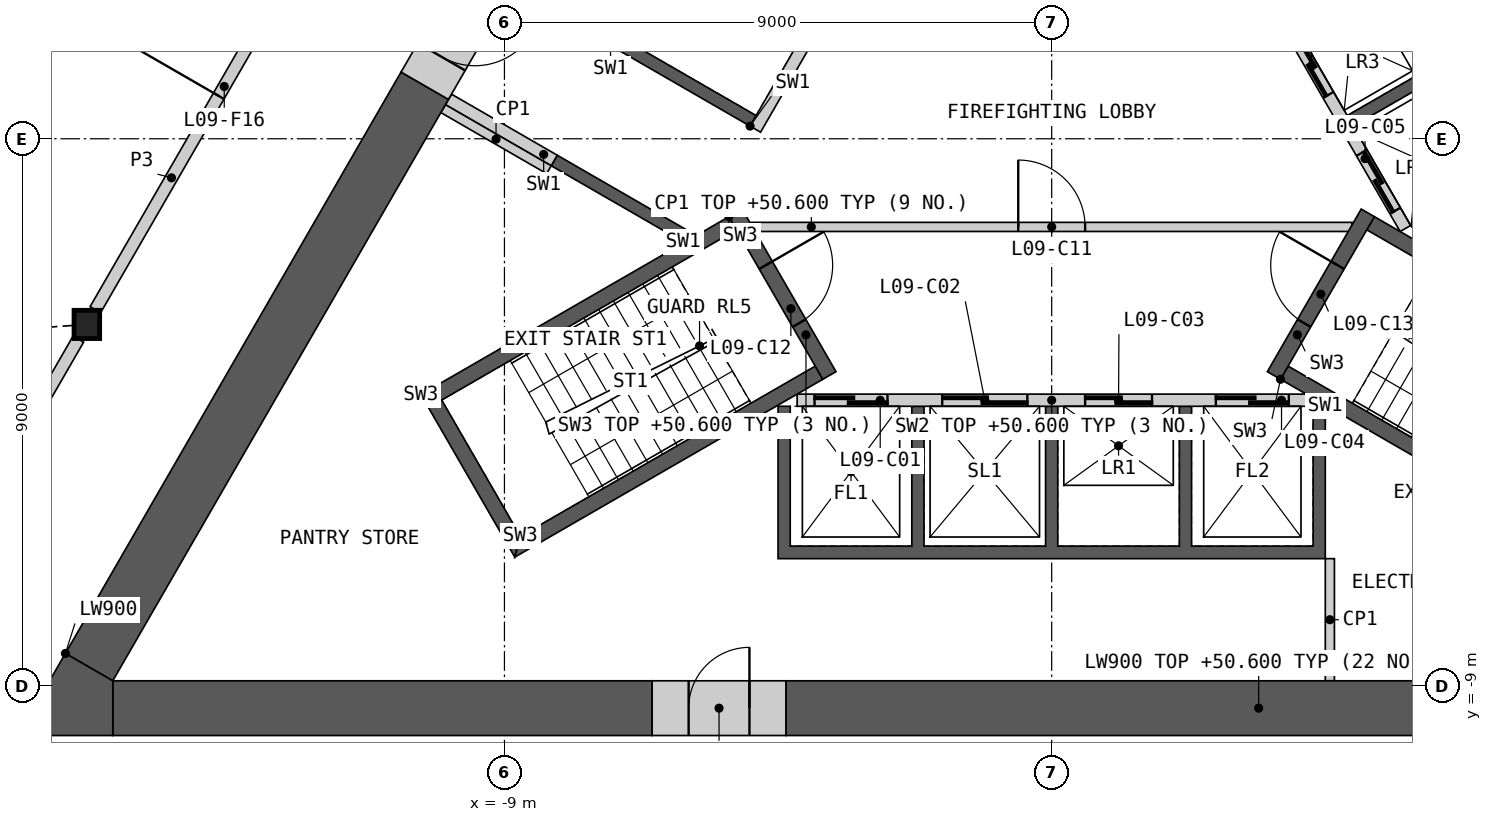
"""IFC4 building model, lengths in metres.
Left out: names, types, materials, properties, quantities, classifications, styles, units other than length and angle.
Written with IfcOpenShell. Run it as: python <this file> out.ifc"""

import sys

from ifc_helpers import new_model, si_unit, direction, frame, frame_2d, origin, origin_2d, place, context, subcontext, project, spatial, polyline, rectangle, i_section, outline, extrude, element, fill, save


model = new_model("IFC4")
c1 = context("Model", 3, precision=1e-05, world=origin(), true_north=direction((0.0, 1.0)))
c2 = subcontext(c1, "Body", "Model", "MODEL_VIEW")
j1 = project(units=[si_unit("LENGTHUNIT", "METRE"), si_unit("PLANEANGLEUNIT", "RADIAN")], contexts=[c1])
p1 = place(None, origin())
s1 = spatial("IfcSite", under=j1, at=p1, CompositionType="ELEMENT")
p2 = place(p1, origin())
s2 = spatial("IfcBuilding", under=s1, at=p2, CompositionType="ELEMENT")
p3 = place(p2, frame((0.0, 0.0, 46.8)))
s3 = spatial("IfcBuildingStorey", under=s2, at=p3, CompositionType="ELEMENT", Elevation=46.8)
p4 = place(p3, frame((-15.868, -3.054, 0.0), z_axis=(0.0, 0.0, 1.0), x_axis=(1.0, 0.0, 0.0)))
e1 = element("IfcColumn", 1, at=p4, inside=s3, PredefinedType="COLUMN", context=c2, shape_type="SweptSolid", body=[
    extrude(i_section(OverallWidth=0.421, OverallDepth=0.465, WebThickness=0.045, FlangeThickness=0.072, at=origin_2d()), origin(), (0.0, 0.0, 1.0), 4.2),
])
p5 = place(p3, origin())
e2 = element("IfcWall", 2, at=p5, inside=s3, PredefinedType="SHEAR", context=c2, shape_type="SweptSolid", body=[
    extrude(outline(polyline([(4.5, -4.4), (4.5, -6.906), (-4.5, -6.906), (-4.5, -4.4), (-4.3, -4.4), (-4.3, -6.7), (-2.3, -6.7), (-2.3, -4.4), (-2.1, -4.4), (-2.1, -6.7), (-0.1, -6.7), (-0.1, -4.4), (0.1, -4.4), (0.1, -6.7), (2.1, -6.7), (2.1, -4.4), (2.3, -4.4), (2.3, -6.7), (4.3, -6.7), (4.3, -4.4), (4.5, -4.4)])), origin(), (0.0, 0.0, 1.0), 3.8),
])
p6 = place(p3, frame((-4.187, -4.3, 0.0), z_axis=(0.0, 0.0, 1.0), x_axis=(1.0, 0.0, 0.0)))
e3 = element("IfcWall", 3, at=p6, inside=s3, PredefinedType="SOLIDWALL", context=c2, shape_type="SweptSolid", body=[
    extrude(rectangle(XDim=8.373, YDim=0.2, at=frame_2d((4.187, 0.0))), origin(), (0.0, 0.0, 1.0), 3.8),
])
p7 = place(p6, frame((0.287, 0.0, 0.0)))
e4 = element("IfcOpeningElement", 4, at=p7, cuts=e3, PredefinedType="OPENING", context=c2, shape_type="SweptSolid", body=[
    extrude(rectangle(XDim=1.2, YDim=2.1, at=frame_2d((0.6, 1.05))), frame((0.0, 0.11, 0.0), z_axis=(0.0, -1.0, 0.0), x_axis=(1.0, 0.0, 0.0)), (0.0, 0.0, 1.0), 0.22),
])
p8 = place(p6, frame((2.387, 0.0, 0.0)))
e5 = element("IfcOpeningElement", 5, at=p8, cuts=e3, PredefinedType="OPENING", context=c2, shape_type="SweptSolid", body=[
    extrude(rectangle(XDim=1.4, YDim=2.1, at=frame_2d((0.7, 1.05))), frame((0.0, 0.11, 0.0), z_axis=(0.0, -1.0, 0.0), x_axis=(1.0, 0.0, 0.0)), (0.0, 0.0, 1.0), 0.22),
])
p9 = place(p6, frame((4.737, 0.0, 0.0)))
e6 = element("IfcOpeningElement", 6, at=p9, cuts=e3, PredefinedType="OPENING", context=c2, shape_type="SweptSolid", body=[
    extrude(rectangle(XDim=1.1, YDim=2.1, at=frame_2d((0.55, 1.05))), frame((0.0, 0.11, 0.0), z_axis=(0.0, -1.0, 0.0), x_axis=(1.0, 0.0, 0.0)), (0.0, 0.0, 1.0), 0.22),
])
p10 = place(p6, frame((6.887, 0.0, 0.0)))
e7 = element("IfcOpeningElement", 7, at=p10, cuts=e3, PredefinedType="OPENING", context=c2, shape_type="SweptSolid", body=[
    extrude(rectangle(XDim=1.2, YDim=2.1, at=frame_2d((0.6, 1.05))), frame((0.0, 0.11, 0.0), z_axis=(0.0, -1.0, 0.0), x_axis=(1.0, 0.0, 0.0)), (0.0, 0.0, 1.0), 0.22),
])
p11 = place(p3, origin())
e8 = element("IfcWall", 8, at=p11, inside=s3, PredefinedType="SHEAR", context=c2, shape_type="SweptSolid", body=[
    extrude(outline(polyline([(2.66, 4.192), (4.831, 5.445), (8.231, -0.444), (6.061, -1.697), (5.96, -1.524), (7.952, -0.374), (6.952, 1.358), (4.96, 0.208), (4.861, 0.381), (6.852, 1.531), (5.852, 3.263), (3.861, 2.113), (3.76, 2.287), (5.752, 3.437), (4.752, 5.169), (2.76, 4.019), (2.66, 4.192)])), origin(), (0.0, 0.0, 1.0), 3.8),
])
p12 = place(p3, frame((5.817, -1.476, 0.0), z_axis=(0.0, 0.0, 1.0), x_axis=(-0.500002616675, 0.866023893041, 0.0)))
e9 = element("IfcWall", 9, at=p12, inside=s3, PredefinedType="SOLIDWALL", context=c2, shape_type="SweptSolid", body=[
    extrude(rectangle(XDim=8.373, YDim=0.2, at=frame_2d((4.187, 0.0))), origin(), (0.0, 0.0, 1.0), 3.8),
])
p13 = place(p12, frame((0.337, 0.0, 0.0)))
e10 = element("IfcOpeningElement", 10, at=p13, cuts=e9, PredefinedType="OPENING", context=c2, shape_type="SweptSolid", body=[
    extrude(rectangle(XDim=1.1, YDim=2.1, at=frame_2d((0.55, 1.05))), frame((0.0, 0.11, 0.0), z_axis=(0.0, -1.0, 0.0), x_axis=(1.0, 0.0, 0.0)), (0.0, 0.0, 1.0), 0.22),
])
p14 = place(p12, frame((2.537, 0.0, 0.0)))
e11 = element("IfcOpeningElement", 11, at=p14, cuts=e9, PredefinedType="OPENING", context=c2, shape_type="SweptSolid", body=[
    extrude(rectangle(XDim=1.1, YDim=2.1, at=frame_2d((0.55, 1.05))), frame((0.0, 0.11, 0.0), z_axis=(0.0, -1.0, 0.0), x_axis=(1.0, 0.0, 0.0)), (0.0, 0.0, 1.0), 0.22),
])
p15 = place(p12, frame((4.737, 0.0, 0.0)))
e12 = element("IfcOpeningElement", 12, at=p15, cuts=e9, PredefinedType="OPENING", context=c2, shape_type="SweptSolid", body=[
    extrude(rectangle(XDim=1.1, YDim=2.1, at=frame_2d((0.55, 1.05))), frame((0.0, 0.11, 0.0), z_axis=(0.0, -1.0, 0.0), x_axis=(1.0, 0.0, 0.0)), (0.0, 0.0, 1.0), 0.22),
])
p16 = place(p12, frame((7.037, 0.0, 0.0)))
e13 = element("IfcOpeningElement", 13, at=p16, cuts=e9, PredefinedType="OPENING", context=c2, shape_type="SweptSolid", body=[
    extrude(rectangle(XDim=0.9, YDim=2.1, at=frame_2d((0.45, 1.05))), frame((0.0, 0.11, 0.0), z_axis=(0.0, -1.0, 0.0), x_axis=(1.0, 0.0, 0.0)), (0.0, 0.0, 1.0), 0.22),
])
p17 = place(p3, origin())
e14 = element("IfcWall", 14, at=p17, inside=s3, PredefinedType="SHEAR", context=c2, shape_type="SweptSolid", body=[
    extrude(outline(polyline([(-6.061, -1.697), (-8.231, -0.444), (-8.131, -0.271), (-5.96, -1.524), (-6.061, -1.697)])), origin(), (0.0, 0.0, 1.0), 3.8),
])
p18 = place(p3, origin())
e15 = element("IfcWall", 15, at=p18, inside=s3, PredefinedType="SHEAR", context=c2, shape_type="SweptSolid", body=[
    extrude(outline(polyline([(-4.96, 0.208), (-7.131, 1.461), (-5.931, 3.54), (-3.76, 2.287), (-3.861, 2.113), (-5.852, 3.263), (-6.852, 1.531), (-4.861, 0.381), (-4.96, 0.208)])), origin(), (0.0, 0.0, 1.0), 3.8),
])
p19 = place(p3, frame((-1.631, 5.776, 0.0), z_axis=(0.0, 0.0, 1.0), x_axis=(-0.499992876559, -0.866029516466, 0.0)))
e16 = element("IfcWall", 16, at=p19, inside=s3, PredefinedType="SOLIDWALL", context=c2, shape_type="SweptSolid", body=[
    extrude(rectangle(XDim=6.486, YDim=0.2, at=frame_2d((3.243, 0.0))), origin(), (0.0, 0.0, 1.0), 3.8),
])
p20 = place(p19, frame((0.437, 0.0, 0.0)))
e17 = element("IfcOpeningElement", 17, at=p20, cuts=e16, PredefinedType="OPENING", context=c2, shape_type="SweptSolid", body=[
    extrude(rectangle(XDim=0.9, YDim=2.1, at=frame_2d((0.45, 1.05))), frame((0.0, 0.11, 0.0), z_axis=(0.0, -1.0, 0.0), x_axis=(1.0, 0.0, 0.0)), (0.0, 0.0, 1.0), 0.22),
])
p21 = place(p19, frame((2.637, 0.0, 0.0)))
e18 = element("IfcOpeningElement", 18, at=p21, cuts=e16, PredefinedType="OPENING", context=c2, shape_type="SweptSolid", body=[
    extrude(rectangle(XDim=0.9, YDim=2.1, at=frame_2d((0.45, 1.05))), frame((0.0, 0.11, 0.0), z_axis=(0.0, -1.0, 0.0), x_axis=(1.0, 0.0, 0.0)), (0.0, 0.0, 1.0), 0.22),
])
p22 = place(p3, frame((-8.181, -0.357, 0.0), z_axis=(0.0, 0.0, 1.0), x_axis=(-0.866035824272, 0.499981950752, 0.0)))
e19 = element("IfcWall", 19, at=p22, inside=s3, PredefinedType="SHEAR", context=c2, shape_type="SweptSolid", body=[
    extrude(rectangle(XDim=2.009, YDim=0.2, at=frame_2d((1.004, 0.0))), origin(), (0.0, 0.0, 1.0), 3.8),
])
p23 = place(p3, frame((-4.941, -1.45, 0.0), z_axis=(0.0, 0.0, 1.0), x_axis=(1.0, 0.0, 0.0)))
e20 = element("IfcWall", 20, at=p23, inside=s3, PredefinedType="PARTITIONING", context=c2, shape_type="SweptSolid", body=[
    extrude(rectangle(XDim=9.882, YDim=0.15, at=frame_2d((4.941, 0.0))), origin(), (0.0, 0.0, 1.0), 3.8),
])
p24 = place(p23, frame((4.391, 0.0, 0.0)))
e21 = element("IfcOpeningElement", 21, at=p24, cuts=e20, PredefinedType="OPENING", context=c2, shape_type="SweptSolid", body=[
    extrude(rectangle(XDim=1.1, YDim=2.1, at=frame_2d((0.55, 1.05))), frame((0.0, 0.085, 0.0), z_axis=(0.0, -1.0, 0.0), x_axis=(1.0, 0.0, 0.0)), (0.0, 0.0, 1.0), 0.17),
])
p25 = place(p3, origin())
e22 = element("IfcWall", 22, at=p25, inside=s3, PredefinedType="SHEAR", context=c2, shape_type="SweptSolid", body=[
    extrude(outline(polyline([(-5.307, -1.281), (-10.374, -4.206), (-10.032, -4.298), (-5.182, -1.498), (-5.307, -1.281)])), origin(), (0.0, 0.0, 1.0), 3.8),
])
p26 = place(p3, origin())
e23 = element("IfcWall", 23, at=p26, inside=s3, PredefinedType="SHEAR", context=c2, shape_type="SweptSolid", body=[
    extrude(outline(polyline([(-10.374, -4.206), (-8.83, -6.881), (-8.738, -6.539), (-10.032, -4.298), (-10.374, -4.206)])), origin(), (0.0, 0.0, 1.0), 3.8),
])
p27 = place(p3, origin())
e24 = element("IfcWall", 24, at=p27, inside=s3, PredefinedType="SHEAR", context=c2, shape_type="SweptSolid", body=[
    extrude(outline(polyline([(-8.738, -6.539), (-8.83, -6.881), (-3.763, -3.956), (-3.888, -3.739), (-8.738, -6.539)])), origin(), (0.0, 0.0, 1.0), 3.8),
])
p28 = place(p3, frame((-5.199, -1.219, 0.0), z_axis=(0.0, 0.0, 1.0), x_axis=(0.499982516597, -0.866035497597, 0.0)))
e25 = element("IfcWall", 25, at=p28, inside=s3, PredefinedType="SHEAR", context=c2, shape_type="SweptSolid", body=[
    extrude(rectangle(XDim=3.088, YDim=0.25, at=frame_2d((1.544, 0.0))), origin(), (0.0, 0.0, 1.0), 3.8),
])
p29 = place(p28, frame((0.994, 0.0, 0.0)))
e26 = element("IfcOpeningElement", 26, at=p29, cuts=e25, PredefinedType="OPENING", context=c2, shape_type="SweptSolid", body=[
    extrude(rectangle(XDim=1.1, YDim=2.1, at=frame_2d((0.55, 1.05))), frame((0.0, 0.135, 0.0), z_axis=(0.0, -1.0, 0.0), x_axis=(1.0, 0.0, 0.0)), (0.0, 0.0, 1.0), 0.27),
])
p30 = place(p3, origin())
e27 = element("IfcWall", 27, at=p30, inside=s3, PredefinedType="SHEAR", context=c2, shape_type="SweptSolid", body=[
    extrude(outline(polyline([(3.763, -3.956), (8.83, -6.881), (8.738, -6.539), (3.888, -3.739), (3.763, -3.956)])), origin(), (0.0, 0.0, 1.0), 3.8),
])
p31 = place(p3, origin())
e28 = element("IfcWall", 28, at=p31, inside=s3, PredefinedType="SHEAR", context=c2, shape_type="SweptSolid", body=[
    extrude(outline(polyline([(10.032, -4.298), (10.374, -4.206), (5.307, -1.281), (5.182, -1.498), (10.032, -4.298)])), origin(), (0.0, 0.0, 1.0), 3.8),
])
p32 = place(p3, frame((3.655, -3.893, 0.0), z_axis=(0.0, 0.0, 1.0), x_axis=(0.499982516597, 0.866035497597, 0.0)))
e29 = element("IfcWall", 29, at=p32, inside=s3, PredefinedType="SHEAR", context=c2, shape_type="SweptSolid", body=[
    extrude(rectangle(XDim=3.088, YDim=0.25, at=frame_2d((1.544, 0.0))), origin(), (0.0, 0.0, 1.0), 3.8),
])
p33 = place(p32, frame((0.994, 0.0, 0.0)))
e30 = element("IfcOpeningElement", 30, at=p33, cuts=e29, PredefinedType="OPENING", context=c2, shape_type="SweptSolid", body=[
    extrude(rectangle(XDim=1.1, YDim=2.1, at=frame_2d((0.55, 1.05))), frame((0.0, 0.135, 0.0), z_axis=(0.0, -1.0, 0.0), x_axis=(1.0, 0.0, 0.0)), (0.0, 0.0, 1.0), 0.27),
])
p34 = place(p3, frame((-8.268, -0.509, 0.0), z_axis=(0.0, 0.0, 1.0), x_axis=(-0.866035824272, 0.499981950752, 0.0)))
e31 = element("IfcWall", 31, at=p34, inside=s3, PredefinedType="PARTITIONING", context=c2, shape_type="SweptSolid", body=[
    extrude(rectangle(XDim=2.009, YDim=0.15, at=frame_2d((1.004, 0.0))), origin(), (0.0, 0.0, 1.0), 3.8),
])
p35 = place(p3, frame((4.575, -6.906, 0.0), z_axis=(0.0, 0.0, 1.0), x_axis=(0.0, -1.0, 0.0)))
e32 = element("IfcWall", 32, at=p35, inside=s3, PredefinedType="PARTITIONING", context=c2, shape_type="SweptSolid", body=[
    extrude(rectangle(XDim=2.009, YDim=0.15, at=frame_2d((1.004, 0.0))), origin(), (0.0, 0.0, 1.0), 3.8),
])
p36 = place(p3, frame((-4.371, -9.365, 0.0), z_axis=(0.0, 0.0, 1.0), x_axis=(1.0, 0.0, 0.0)))
e33 = element("IfcWall", 33, at=p36, inside=s3, PredefinedType="SHEAR", context=c2, shape_type="SweptSolid", body=[
    extrude(rectangle(XDim=15.55, YDim=0.9, at=frame_2d((7.775, 0.0))), origin(), (0.0, 0.0, 1.0), 3.8),
])
p37 = place(p3, frame((-15.441, -9.365, 0.0), z_axis=(0.0, 0.0, 1.0), x_axis=(1.0, 0.0, 0.0)))
e34 = element("IfcWall", 34, at=p37, inside=s3, PredefinedType="SHEAR", context=c2, shape_type="SweptSolid", body=[
    extrude(rectangle(XDim=8.871, YDim=0.9, at=frame_2d((4.435, 0.0))), origin(), (0.0, 0.0, 1.0), 3.8),
])
p38 = place(p3, frame((-10.31, 0.872, 0.0), z_axis=(0.0, 0.0, 1.0), x_axis=(-0.499991697393, -0.866030197244, 0.0)))
e35 = element("IfcWall", 35, at=p38, inside=s3, PredefinedType="SHEAR", context=c2, shape_type="SweptSolid", body=[
    extrude(rectangle(XDim=11.041, YDim=0.9, at=frame_2d((5.521, 0.0))), origin(), (0.0, 0.0, 1.0), 3.8),
])
p39 = place(p3, origin())
e36 = element("IfcWall", 36, at=p39, inside=s3, PredefinedType="SHEAR", context=c2, shape_type="SweptSolid", body=[
    extrude(outline(polyline([(-16.221, -8.465), (-15.441, -8.915), (-15.441, -9.815), (-17.0, -9.815), (-16.221, -8.465)])), origin(), (0.0, 0.0, 1.0), 3.8),
])
p40 = place(p3, frame((-6.571, -9.365, 0.0), z_axis=(0.0, 0.0, 1.0), x_axis=(1.0, 0.0, 0.0)))
e37 = element("IfcWall", 37, at=p40, inside=s3, PredefinedType="SHEAR", context=c2, shape_type="SweptSolid", body=[
    extrude(rectangle(XDim=2.2, YDim=0.9, at=frame_2d((1.1, 0.0))), origin(), (0.0, 0.0, 1.0), 3.8),
])
p41 = place(p40, frame((0.6, 0.0, 0.0)))
e38 = element("IfcOpeningElement", 38, at=p41, cuts=e37, PredefinedType="OPENING", context=c2, shape_type="SweptSolid", body=[
    extrude(rectangle(XDim=1.0, YDim=2.1, at=frame_2d((0.5, 1.05))), frame((0.0, 0.46, 0.0), z_axis=(0.0, -1.0, 0.0), x_axis=(1.0, 0.0, 0.0)), (0.0, 0.0, 1.0), 0.92),
])
p42 = place(p3, frame((-9.21, 2.777, 0.0), z_axis=(0.0, 0.0, 1.0), x_axis=(-0.500077893725, -0.86598042715, 0.0)))
e39 = element("IfcWall", 39, at=p42, inside=s3, PredefinedType="SHEAR", context=c2, shape_type="SweptSolid", body=[
    extrude(rectangle(XDim=2.2, YDim=0.9, at=frame_2d((1.1, 0.0))), origin(), (0.0, 0.0, 1.0), 3.8),
])
p43 = place(p42, frame((0.55, 0.0, 0.0)))
e40 = element("IfcOpeningElement", 40, at=p43, cuts=e39, PredefinedType="OPENING", context=c2, shape_type="SweptSolid", body=[
    extrude(rectangle(XDim=1.1, YDim=2.1, at=frame_2d((0.55, 1.05))), frame((0.0, 0.46, 0.0), z_axis=(0.0, -1.0, 0.0), x_axis=(1.0, 0.0, 0.0)), (0.0, 0.0, 1.0), 0.92),
])
p44 = place(p3, frame((-15.728, -2.811, 0.0), z_axis=(0.0, 0.0, 1.0), x_axis=(0.49999175339, 0.866030164915, 0.0)))
e41 = element("IfcWall", 41, at=p44, inside=s3, PredefinedType="PARTITIONING", context=c2, shape_type="SweptSolid", body=[
    extrude(rectangle(XDim=10.019, YDim=0.2, at=frame_2d((5.009, 0.0))), origin(), (0.0, 0.0, 1.0), 3.8),
])
p45 = place(p44, frame((4.059, 0.0, 0.0)))
e42 = element("IfcOpeningElement", 42, at=p45, cuts=e41, PredefinedType="OPENING", context=c2, shape_type="SweptSolid", body=[
    extrude(rectangle(XDim=1.8, YDim=2.1, at=frame_2d((0.9, 1.05))), frame((0.0, 0.11, 0.0), z_axis=(0.0, -1.0, 0.0), x_axis=(1.0, 0.0, 0.0)), (0.0, 0.0, 1.0), 0.22),
])
p46 = place(p3, frame((-19.244, -8.902, 0.0), z_axis=(0.0, 0.0, 1.0), x_axis=(0.499984737558, 0.86603421538, 0.0)))
e43 = element("IfcWall", 43, at=p46, inside=s3, PredefinedType="PARTITIONING", context=c2, shape_type="SweptSolid", body=[
    extrude(rectangle(XDim=6.473, YDim=0.2, at=frame_2d((3.236, 0.0))), origin(), (0.0, 0.0, 1.0), 3.8),
])
p47 = place(p7, origin())
e44 = element("IfcDoor", 44, at=p47, inside=s3, OperationType="SLIDING_TO_LEFT", PredefinedType="DOOR", context=c2, shape_type="SweptSolid", body=[
    extrude(rectangle(XDim=1.2, YDim=2.1, at=frame_2d((0.6, 1.05))), frame((0.0, 0.025, 0.0), z_axis=(0.0, -1.0, 0.0), x_axis=(1.0, 0.0, 0.0)), (0.0, 0.0, 1.0), 0.05),
])
fill(e4, e44)
p48 = place(p8, origin())
e45 = element("IfcDoor", 45, at=p48, inside=s3, OperationType="SLIDING_TO_LEFT", PredefinedType="DOOR", context=c2, shape_type="SweptSolid", body=[
    extrude(rectangle(XDim=1.4, YDim=2.1, at=frame_2d((0.7, 1.05))), frame((0.0, 0.025, 0.0), z_axis=(0.0, -1.0, 0.0), x_axis=(1.0, 0.0, 0.0)), (0.0, 0.0, 1.0), 0.05),
])
fill(e5, e45)
p49 = place(p9, origin())
e46 = element("IfcDoor", 46, at=p49, inside=s3, OperationType="SLIDING_TO_LEFT", PredefinedType="DOOR", context=c2, shape_type="SweptSolid", body=[
    extrude(rectangle(XDim=1.1, YDim=2.1, at=frame_2d((0.55, 1.05))), frame((0.0, 0.025, 0.0), z_axis=(0.0, -1.0, 0.0), x_axis=(1.0, 0.0, 0.0)), (0.0, 0.0, 1.0), 0.05),
])
fill(e6, e46)
p50 = place(p10, origin())
e47 = element("IfcDoor", 47, at=p50, inside=s3, OperationType="SLIDING_TO_LEFT", PredefinedType="DOOR", context=c2, shape_type="SweptSolid", body=[
    extrude(rectangle(XDim=1.2, YDim=2.1, at=frame_2d((0.6, 1.05))), frame((0.0, 0.025, 0.0), z_axis=(0.0, -1.0, 0.0), x_axis=(1.0, 0.0, 0.0)), (0.0, 0.0, 1.0), 0.05),
])
fill(e7, e47)
p51 = place(p13, origin())
e48 = element("IfcDoor", 48, at=p51, inside=s3, OperationType="SLIDING_TO_LEFT", PredefinedType="DOOR", context=c2, shape_type="SweptSolid", body=[
    extrude(rectangle(XDim=1.1, YDim=2.1, at=frame_2d((0.55, 1.05))), frame((0.0, 0.025, 0.0), z_axis=(0.0, -1.0, 0.0), x_axis=(1.0, 0.0, 0.0)), (0.0, 0.0, 1.0), 0.05),
])
fill(e10, e48)
p52 = place(p14, origin())
e49 = element("IfcDoor", 49, at=p52, inside=s3, OperationType="SLIDING_TO_LEFT", PredefinedType="DOOR", context=c2, shape_type="SweptSolid", body=[
    extrude(rectangle(XDim=1.1, YDim=2.1, at=frame_2d((0.55, 1.05))), frame((0.0, 0.025, 0.0), z_axis=(0.0, -1.0, 0.0), x_axis=(1.0, 0.0, 0.0)), (0.0, 0.0, 1.0), 0.05),
])
fill(e11, e49)
p53 = place(p24, origin())
e50 = element("IfcDoor", 50, at=p53, inside=s3, OperationType="SINGLE_SWING_LEFT", PredefinedType="DOOR", context=c2, shape_type="SweptSolid", body=[
    extrude(rectangle(XDim=1.1, YDim=2.1, at=frame_2d((0.55, 1.05))), frame((0.0, 0.025, 0.0), z_axis=(0.0, -1.0, 0.0), x_axis=(1.0, 0.0, 0.0)), (0.0, 0.0, 1.0), 0.05),
])
fill(e21, e50)
p54 = place(p29, origin())
e51 = element("IfcDoor", 51, at=p54, inside=s3, OperationType="SINGLE_SWING_LEFT", PredefinedType="DOOR", context=c2, shape_type="SweptSolid", body=[
    extrude(rectangle(XDim=1.1, YDim=2.1, at=frame_2d((0.55, 1.05))), frame((0.0, 0.025, 0.0), z_axis=(0.0, -1.0, 0.0), x_axis=(1.0, 0.0, 0.0)), (0.0, 0.0, 1.0), 0.05),
])
fill(e26, e51)
p55 = place(p33, origin())
e52 = element("IfcDoor", 52, at=p55, inside=s3, OperationType="SINGLE_SWING_RIGHT", PredefinedType="DOOR", context=c2, shape_type="SweptSolid", body=[
    extrude(rectangle(XDim=1.1, YDim=2.1, at=frame_2d((0.55, 1.05))), frame((0.0, 0.025, 0.0), z_axis=(0.0, -1.0, 0.0), x_axis=(1.0, 0.0, 0.0)), (0.0, 0.0, 1.0), 0.05),
])
fill(e30, e52)
p56 = place(p41, origin())
e53 = element("IfcDoor", 53, at=p56, inside=s3, OperationType="SINGLE_SWING_RIGHT", PredefinedType="DOOR", context=c2, shape_type="SweptSolid", body=[
    extrude(rectangle(XDim=1.0, YDim=2.1, at=frame_2d((0.5, 1.05))), frame((0.0, 0.205, 0.0), z_axis=(0.0, -1.0, 0.0), x_axis=(1.0, 0.0, 0.0)), (0.0, 0.0, 1.0), 0.05),
])
fill(e38, e53)
p57 = place(p43, origin())
e54 = element("IfcDoor", 54, at=p57, inside=s3, OperationType="SINGLE_SWING_LEFT", PredefinedType="DOOR", context=c2, shape_type="SweptSolid", body=[
    extrude(rectangle(XDim=1.1, YDim=2.1, at=frame_2d((0.55, 1.05))), frame((0.0, 0.205, 0.0), z_axis=(0.0, -1.0, 0.0), x_axis=(1.0, 0.0, 0.0)), (0.0, 0.0, 1.0), 0.05),
])
fill(e40, e54)
p58 = place(p45, origin())
e55 = element("IfcDoor", 55, at=p58, inside=s3, OperationType="DOUBLE_DOOR_SINGLE_SWING", PredefinedType="DOOR", context=c2, shape_type="SweptSolid", body=[
    extrude(rectangle(XDim=1.8, YDim=2.1, at=frame_2d((0.9, 1.05))), frame((0.0, 0.025, 0.0), z_axis=(0.0, -1.0, 0.0), x_axis=(1.0, 0.0, 0.0)), (0.0, 0.0, 1.0), 0.05),
])
fill(e42, e55)
save(model, sys.argv[1])
